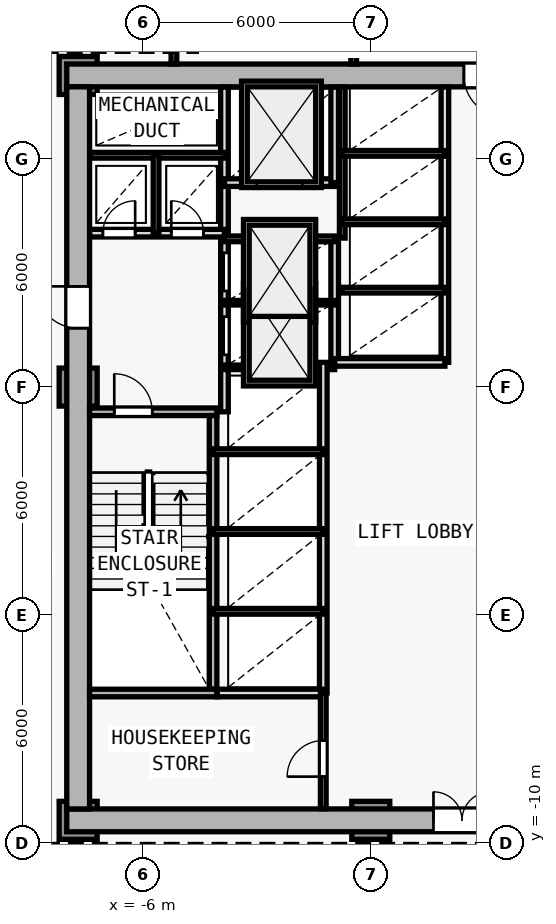
"""IFC4 building model, lengths in metres.
Left out: names, types, materials, properties, quantities, classifications, styles, units other than length and angle.
Written with IfcOpenShell. Run it as: python <this file> out.ifc"""

import sys

from ifc_helpers import new_model, si_unit, direction, frame, frame_2d, origin, origin_2d, place, context, subcontext, project, spatial, rectangle, extrude, element, fill, save


model = new_model("IFC4")
c1 = context("Model", 3, precision=1e-05, world=origin(), true_north=direction((0.0, 1.0)))
c2 = subcontext(c1, "Body", "Model", "MODEL_VIEW")
j1 = project(units=[si_unit("LENGTHUNIT", "METRE"), si_unit("PLANEANGLEUNIT", "RADIAN")], contexts=[c1])
p1 = place(None, origin())
s1 = spatial("IfcSite", under=j1, at=p1, CompositionType="ELEMENT")
p2 = place(p1, origin())
s2 = spatial("IfcBuilding", under=s1, at=p2, CompositionType="ELEMENT")
p3 = place(p2, frame((0.0, 0.0, 17.6)))
s3 = spatial("IfcBuildingStorey", under=s2, at=p3, CompositionType="ELEMENT", Elevation=17.6)
for number, where, z_axis, x_axis in (
    (1, (-7.7, -9.4, 0.0), (0.0, 0.0, 1.0), (1.0, 0.0, 0.0)),
    (2, (-7.7, 10.2, 0.0), (0.0, 0.0, 1.0), (1.0, 0.0, 0.0)),
    (3, (0.0, -9.4, 0.0), (0.0, 0.0, 1.0), (1.0, 0.0, 0.0)),
    (4, (-7.7, 2.0, 0.0), (0.0, 0.0, 1.0), (1.0, 0.0, 0.0)),
):
    element("IfcColumn", number, at=place(p3, frame(where, z_axis=z_axis, x_axis=x_axis)), inside=s3, PredefinedType="COLUMN", context=c2, shape_type="SweptSolid", body=[
        extrude(rectangle(XDim=1.0, YDim=1.0, at=origin_2d()), origin(), (0.0, 0.0, 1.0), 4.2),
    ])
p4 = place(p3, frame((-8.0, -9.4, 0.0), z_axis=(0.0, 0.0, 1.0), x_axis=(1.0, 0.0, 0.0)))
e5 = element("IfcWall", 5, at=p4, inside=s3, PredefinedType="SHEAR", context=c2, shape_type="SweptSolid", body=[
    extrude(rectangle(XDim=16.0, YDim=0.6, at=frame_2d((8.0, 0.0))), origin(), (0.0, 0.0, 1.0), 3.88),
])
p5 = place(p4, frame((9.65, 0.0, 0.0)))
e6 = element("IfcOpeningElement", 6, at=p5, cuts=e5, PredefinedType="OPENING", context=c2, shape_type="SweptSolid", body=[
    extrude(rectangle(XDim=1.5, YDim=2.2, at=frame_2d((0.75, 1.1))), frame((0.0, 0.31, 0.0), z_axis=(0.0, -1.0, 0.0), x_axis=(1.0, 0.0, 0.0)), (0.0, 0.0, 1.0), 0.62),
])
p6 = place(p3, frame((8.0, 10.2, 0.0), z_axis=(0.0, 0.0, 1.0), x_axis=(-1.0, 0.0, 0.0)))
e7 = element("IfcWall", 7, at=p6, inside=s3, PredefinedType="SHEAR", context=c2, shape_type="SweptSolid", body=[
    extrude(rectangle(XDim=16.0, YDim=0.6, at=frame_2d((8.0, 0.0))), origin(), (0.0, 0.0, 1.0), 3.88),
])
p7 = place(p6, frame((4.45, 0.0, 0.0)))
e8 = element("IfcOpeningElement", 8, at=p7, cuts=e7, PredefinedType="OPENING", context=c2, shape_type="SweptSolid", body=[
    extrude(rectangle(XDim=1.1, YDim=2.15, at=frame_2d((0.55, 1.075))), frame((0.0, 0.31, 0.0), z_axis=(0.0, -1.0, 0.0), x_axis=(1.0, 0.0, 0.0)), (0.0, 0.0, 1.0), 0.62),
])
p8 = place(p3, frame((-7.7, -9.1, 0.0), z_axis=(0.0, 0.0, 1.0), x_axis=(0.0, 1.0, 0.0)))
e9 = element("IfcWall", 9, at=p8, inside=s3, PredefinedType="SHEAR", context=c2, shape_type="SweptSolid", body=[
    extrude(rectangle(XDim=19.0, YDim=0.6, at=frame_2d((9.5, 0.0))), origin(), (0.0, 0.0, 1.0), 3.88),
])
p9 = place(p8, frame((12.65, 0.0, 0.0)))
e10 = element("IfcOpeningElement", 10, at=p9, cuts=e9, PredefinedType="OPENING", context=c2, shape_type="SweptSolid", body=[
    extrude(rectangle(XDim=1.1, YDim=2.15, at=frame_2d((0.55, 1.075))), frame((0.0, 0.31, 0.0), z_axis=(0.0, -1.0, 0.0), x_axis=(1.0, 0.0, 0.0)), (0.0, 0.0, 1.0), 0.62),
])
p10 = place(p3, frame((-7.4, 1.35, 0.0), z_axis=(0.0, 0.0, 1.0), x_axis=(1.0, 0.0, 0.0)))
e11 = element("IfcWall", 11, at=p10, inside=s3, PredefinedType="SOLIDWALL", context=c2, shape_type="SweptSolid", body=[
    extrude(rectangle(XDim=3.35, YDim=0.2, at=frame_2d((1.675, 0.0))), origin(), (0.0, 0.0, 1.0), 3.88),
])
p11 = place(p10, frame((0.65, 0.0, 0.0)))
e12 = element("IfcOpeningElement", 12, at=p11, cuts=e11, PredefinedType="OPENING", context=c2, shape_type="SweptSolid", body=[
    extrude(rectangle(XDim=1.0, YDim=2.15, at=frame_2d((0.5, 1.075))), frame((0.0, 0.11, 0.0), z_axis=(0.0, -1.0, 0.0), x_axis=(1.0, 0.0, 0.0)), (0.0, 0.0, 1.0), 0.22),
])
p12 = place(p3, frame((-4.15, -5.95, 0.0), z_axis=(0.0, 0.0, 1.0), x_axis=(0.0, 1.0, 0.0)))
e13 = element("IfcWall", 13, at=p12, inside=s3, PredefinedType="SOLIDWALL", context=c2, shape_type="SweptSolid", body=[
    extrude(rectangle(XDim=7.2, YDim=0.2, at=frame_2d((3.6, 0.0))), origin(), (0.0, 0.0, 1.0), 3.88),
])
p13 = place(p3, frame((-3.85, 1.35, 0.0), z_axis=(0.0, 0.0, 1.0), x_axis=(0.0, 1.0, 0.0)))
e14 = element("IfcWall", 14, at=p13, inside=s3, PredefinedType="SOLIDWALL", context=c2, shape_type="SweptSolid", body=[
    extrude(rectangle(XDim=8.545, YDim=0.2, at=frame_2d((4.272, 0.0))), origin(), (0.0, 0.0, 1.0), 3.88),
])
p14 = place(p13, frame((1.5, 0.0, 0.0)))
e15 = element("IfcOpeningElement", 15, at=p14, cuts=e14, PredefinedType="OPENING", context=c2, shape_type="SweptSolid", body=[
    extrude(rectangle(XDim=1.0, YDim=2.15, at=frame_2d((0.5, 1.075))), frame((0.0, 0.11, 0.0), z_axis=(0.0, -1.0, 0.0), x_axis=(1.0, 0.0, 0.0)), (0.0, 0.0, 1.0), 0.22),
])
p15 = place(p13, frame((3.18, 0.0, 0.0)))
e16 = element("IfcOpeningElement", 16, at=p15, cuts=e14, PredefinedType="OPENING", context=c2, shape_type="SweptSolid", body=[
    extrude(rectangle(XDim=1.0, YDim=2.15, at=frame_2d((0.5, 1.075))), frame((0.0, 0.11, 0.0), z_axis=(0.0, -1.0, 0.0), x_axis=(1.0, 0.0, 0.0)), (0.0, 0.0, 1.0), 0.22),
])
p16 = place(p3, frame((-7.395, 6.05, 0.0), z_axis=(0.0, 0.0, 1.0), x_axis=(1.0, 0.0, 0.0)))
e17 = element("IfcWall", 17, at=p16, inside=s3, PredefinedType="SOLIDWALL", context=c2, shape_type="SweptSolid", body=[
    extrude(rectangle(XDim=3.545, YDim=0.2, at=frame_2d((1.772, 0.0))), origin(), (0.0, 0.0, 1.0), 3.88),
])
p17 = place(p16, frame((0.345, 0.0, 0.0)))
e18 = element("IfcOpeningElement", 18, at=p17, cuts=e17, PredefinedType="OPENING", context=c2, shape_type="SweptSolid", body=[
    extrude(rectangle(XDim=0.85, YDim=2.1, at=frame_2d((0.425, 1.05))), frame((0.0, 0.11, 0.0), z_axis=(0.0, -1.0, 0.0), x_axis=(1.0, 0.0, 0.0)), (0.0, 0.0, 1.0), 0.22),
])
p18 = place(p16, frame((2.145, 0.0, 0.0)))
e19 = element("IfcOpeningElement", 19, at=p18, cuts=e17, PredefinedType="OPENING", context=c2, shape_type="SweptSolid", body=[
    extrude(rectangle(XDim=0.85, YDim=2.1, at=frame_2d((0.425, 1.05))), frame((0.0, 0.11, 0.0), z_axis=(0.0, -1.0, 0.0), x_axis=(1.0, 0.0, 0.0)), (0.0, 0.0, 1.0), 0.22),
])
p19 = place(p3, frame((-7.395, 8.1, 0.0), z_axis=(0.0, 0.0, 1.0), x_axis=(1.0, 0.0, 0.0)))
e20 = element("IfcWall", 20, at=p19, inside=s3, PredefinedType="PARTITIONING", context=c2, shape_type="SweptSolid", body=[
    extrude(rectangle(XDim=3.545, YDim=0.15, at=frame_2d((1.772, 0.0))), origin(), (0.0, 0.0, 1.0), 3.88),
])
p20 = place(p3, frame((-5.65, 6.05, 0.0), z_axis=(0.0, 0.0, 1.0), x_axis=(0.0, 1.0, 0.0)))
e21 = element("IfcWall", 21, at=p20, inside=s3, PredefinedType="PARTITIONING", context=c2, shape_type="SweptSolid", body=[
    extrude(rectangle(XDim=2.05, YDim=0.15, at=frame_2d((1.025, 0.0))), origin(), (0.0, 0.0, 1.0), 3.88),
])
p21 = place(p3, frame((-0.95, 2.65, 0.0), z_axis=(0.0, 0.0, 1.0), x_axis=(0.0, 1.0, 0.0)))
e22 = element("IfcWall", 22, at=p21, inside=s3, PredefinedType="SOLIDWALL", context=c2, shape_type="SweptSolid", body=[
    extrude(rectangle(XDim=3.27, YDim=0.2, at=frame_2d((1.635, 0.0))), origin(), (0.0, 0.0, 1.0), 3.88),
])
for number, where, z_axis, x_axis in (
    (23, (-3.85, 2.52, 0.0), (0.0, 0.0, 1.0), (1.0, 0.0, 0.0)),
    (24, (-3.85, 4.22, 0.0), (0.0, 0.0, 1.0), (1.0, 0.0, 0.0)),
):
    element("IfcWall", number, at=place(p3, frame(where, z_axis=z_axis, x_axis=x_axis)), inside=s3, PredefinedType="PARTITIONING", context=c2, shape_type="SweptSolid", body=[
        extrude(rectangle(XDim=2.9, YDim=0.12, at=frame_2d((1.45, 0.0))), origin(), (0.0, 0.0, 1.0), 3.88),
    ])
p22 = place(p3, frame((-3.85, 5.9, 0.0), z_axis=(0.0, 0.0, 1.0), x_axis=(1.0, 0.0, 0.0)))
e25 = element("IfcWall", 25, at=p22, inside=s3, PredefinedType="PARTITIONING", context=c2, shape_type="SweptSolid", body=[
    extrude(rectangle(XDim=2.9, YDim=0.15, at=frame_2d((1.45, 0.0))), origin(), (0.0, 0.0, 1.0), 3.88),
])
p23 = place(p3, frame((-3.85, 7.38, 0.0), z_axis=(0.0, 0.0, 1.0), x_axis=(1.0, 0.0, 0.0)))
e26 = element("IfcWall", 26, at=p23, inside=s3, PredefinedType="SOLIDWALL", context=c2, shape_type="SweptSolid", body=[
    extrude(rectangle(XDim=2.9, YDim=0.2, at=frame_2d((1.45, 0.0))), origin(), (0.0, 0.0, 1.0), 3.88),
])
p24 = place(p23, frame((0.85, 0.0, 0.0)))
e27 = element("IfcOpeningElement", 27, at=p24, cuts=e26, PredefinedType="OPENING", context=c2, shape_type="SweptSolid", body=[
    extrude(rectangle(XDim=1.2, YDim=2.2, at=frame_2d((0.6, 1.1))), frame((0.0, 0.11, 0.0), z_axis=(0.0, -1.0, 0.0), x_axis=(1.0, 0.0, 0.0)), (0.0, 0.0, 1.0), 0.22),
])
p25 = place(p3, frame((-0.95, 7.38, 0.0), z_axis=(0.0, 0.0, 1.0), x_axis=(0.0, 1.0, 0.0)))
e28 = element("IfcWall", 28, at=p25, inside=s3, PredefinedType="SOLIDWALL", context=c2, shape_type="SweptSolid", body=[
    extrude(rectangle(XDim=2.515, YDim=0.2, at=frame_2d((1.258, 0.0))), origin(), (0.0, 0.0, 1.0), 3.88),
])
p26 = place(p3, frame((-1.25, -6.05, 0.0), z_axis=(0.0, 0.0, 1.0), x_axis=(0.0, 1.0, 0.0)))
e29 = element("IfcWall", 29, at=p26, inside=s3, PredefinedType="SOLIDWALL", context=c2, shape_type="SweptSolid", body=[
    extrude(rectangle(XDim=8.7, YDim=0.2, at=frame_2d((4.35, 0.0))), origin(), (0.0, 0.0, 1.0), 3.88),
])
for number, where, z_axis, x_axis in (
    (30, (-4.15, -3.9, 0.0), (0.0, 0.0, 1.0), (1.0, 0.0, 0.0)),
    (31, (-4.15, -1.8, 0.0), (0.0, 0.0, 1.0), (1.0, 0.0, 0.0)),
    (32, (-4.15, 0.3, 0.0), (0.0, 0.0, 1.0), (1.0, 0.0, 0.0)),
):
    element("IfcWall", number, at=place(p3, frame(where, z_axis=z_axis, x_axis=x_axis)), inside=s3, PredefinedType="PARTITIONING", context=c2, shape_type="SweptSolid", body=[
        extrude(rectangle(XDim=2.9, YDim=0.15, at=frame_2d((1.45, 0.0))), origin(), (0.0, 0.0, 1.0), 3.88),
    ])
p27 = place(p3, frame((1.95, 2.65, 0.0), z_axis=(0.0, 0.0, 1.0), x_axis=(0.0, 1.0, 0.0)))
e33 = element("IfcWall", 33, at=p27, inside=s3, PredefinedType="SOLIDWALL", context=c2, shape_type="SweptSolid", body=[
    extrude(rectangle(XDim=7.245, YDim=0.2, at=frame_2d((3.623, 0.0))), origin(), (0.0, 0.0, 1.0), 3.88),
])
p28 = place(p3, frame((-0.95, 2.65, 0.0), z_axis=(0.0, 0.0, 1.0), x_axis=(1.0, 0.0, 0.0)))
e34 = element("IfcWall", 34, at=p28, inside=s3, PredefinedType="SOLIDWALL", context=c2, shape_type="SweptSolid", body=[
    extrude(rectangle(XDim=2.9, YDim=0.2, at=frame_2d((1.45, 0.0))), origin(), (0.0, 0.0, 1.0), 3.88),
])
p29 = place(p3, frame((-0.75, 5.92, 0.0), z_axis=(0.0, 0.0, 1.0), x_axis=(0.0, 1.0, 0.0)))
e35 = element("IfcWall", 35, at=p29, inside=s3, PredefinedType="PARTITIONING", context=c2, shape_type="SweptSolid", body=[
    extrude(rectangle(XDim=3.975, YDim=0.15, at=frame_2d((1.988, 0.0))), origin(), (0.0, 0.0, 1.0), 3.88),
])
for number, where, z_axis, x_axis in (
    (36, (-0.75, 4.55, 0.0), (0.0, 0.0, 1.0), (1.0, 0.0, 0.0)),
    (37, (-0.75, 6.35, 0.0), (0.0, 0.0, 1.0), (1.0, 0.0, 0.0)),
    (38, (-0.75, 8.15, 0.0), (0.0, 0.0, 1.0), (1.0, 0.0, 0.0)),
):
    element("IfcWall", number, at=place(p3, frame(where, z_axis=z_axis, x_axis=x_axis)), inside=s3, PredefinedType="PARTITIONING", context=c2, shape_type="SweptSolid", body=[
        extrude(rectangle(XDim=2.7, YDim=0.15, at=frame_2d((1.35, 0.0))), origin(), (0.0, 0.0, 1.0), 3.88),
    ])
p30 = place(p3, frame((-7.4, -6.05, 0.0), z_axis=(0.0, 0.0, 1.0), x_axis=(1.0, 0.0, 0.0)))
e39 = element("IfcWall", 39, at=p30, inside=s3, PredefinedType="SOLIDWALL", context=c2, shape_type="SweptSolid", body=[
    extrude(rectangle(XDim=3.35, YDim=0.2, at=frame_2d((1.675, 0.0))), origin(), (0.0, 0.0, 1.0), 3.88),
])
p31 = place(p3, frame((-4.04, -6.05, 0.0), z_axis=(0.0, 0.0, 1.0), x_axis=(1.0, 0.0, 0.0)))
e40 = element("IfcWall", 40, at=p31, inside=s3, PredefinedType="SOLIDWALL", context=c2, shape_type="SweptSolid", body=[
    extrude(rectangle(XDim=2.79, YDim=0.2, at=frame_2d((1.395, 0.0))), origin(), (0.0, 0.0, 1.0), 3.88),
])
p32 = place(p3, frame((-1.25, -9.095, 0.0), z_axis=(0.0, 0.0, 1.0), x_axis=(0.0, 1.0, 0.0)))
e41 = element("IfcWall", 41, at=p32, inside=s3, PredefinedType="PARTITIONING", context=c2, shape_type="SweptSolid", body=[
    extrude(rectangle(XDim=3.045, YDim=0.15, at=frame_2d((1.522, 0.0))), origin(), (0.0, 0.0, 1.0), 3.88),
])
p33 = place(p32, frame((0.845, 0.0, 0.0)))
e42 = element("IfcOpeningElement", 42, at=p33, cuts=e41, PredefinedType="OPENING", context=c2, shape_type="SweptSolid", body=[
    extrude(rectangle(XDim=0.95, YDim=2.1, at=frame_2d((0.475, 1.05))), frame((0.0, 0.085, 0.0), z_axis=(0.0, -1.0, 0.0), x_axis=(1.0, 0.0, 0.0)), (0.0, 0.0, 1.0), 0.17),
])
p34 = place(p3, frame((-5.18, 10.5, 0.0), z_axis=(0.0, 0.0, 1.0), x_axis=(0.0, 1.0, 0.0)))
e43 = element("IfcWall", 43, at=p34, inside=s3, PredefinedType="PARTITIONING", context=c2, shape_type="SweptSolid", body=[
    extrude(rectangle(XDim=7.78, YDim=0.15, at=frame_2d((3.89, 0.0))), origin(), (0.0, 0.0, 1.0), 3.88),
])
p35 = place(p34, frame((1.849, 0.0, 0.0)))
e44 = element("IfcOpeningElement", 44, at=p35, cuts=e43, PredefinedType="OPENING", context=c2, shape_type="SweptSolid", body=[
    extrude(rectangle(XDim=0.9, YDim=2.1, at=frame_2d((0.45, 1.05))), frame((0.0, 0.085, 0.0), z_axis=(0.0, -1.0, 0.0), x_axis=(1.0, 0.0, 0.0)), (0.0, 0.0, 1.0), 0.17),
])
p36 = place(p3, frame((-0.45, 10.5, 0.0), z_axis=(0.0, 0.0, 1.0), x_axis=(0.0, 1.0, 0.0)))
e45 = element("IfcWall", 45, at=p36, inside=s3, PredefinedType="PARTITIONING", context=c2, shape_type="SweptSolid", body=[
    extrude(rectangle(XDim=4.75, YDim=0.15, at=frame_2d((2.375, 0.0))), origin(), (0.0, 0.0, 1.0), 3.88),
])
p37 = place(p5, origin())
e46 = element("IfcDoor", 46, at=p37, inside=s3, OperationType="DOUBLE_DOOR_SINGLE_SWING", PredefinedType="DOOR", context=c2, shape_type="SweptSolid", body=[
    extrude(rectangle(XDim=1.5, YDim=2.2, at=frame_2d((0.75, 1.1))), frame((0.0, 0.025, 0.0), z_axis=(0.0, -1.0, 0.0), x_axis=(1.0, 0.0, 0.0)), (0.0, 0.0, 1.0), 0.05),
])
fill(e6, e46)
p38 = place(p9, origin())
e47 = element("IfcDoor", 47, at=p38, inside=s3, OperationType="SINGLE_SWING_RIGHT", PredefinedType="DOOR", context=c2, shape_type="SweptSolid", body=[
    extrude(rectangle(XDim=1.1, YDim=2.15, at=frame_2d((0.55, 1.075))), frame((0.0, 0.025, 0.0), z_axis=(0.0, -1.0, 0.0), x_axis=(1.0, 0.0, 0.0)), (0.0, 0.0, 1.0), 0.05),
])
fill(e10, e47)
p39 = place(p7, origin())
e48 = element("IfcDoor", 48, at=p39, inside=s3, OperationType="SINGLE_SWING_LEFT", PredefinedType="DOOR", context=c2, shape_type="SweptSolid", body=[
    extrude(rectangle(XDim=1.1, YDim=2.15, at=frame_2d((0.55, 1.075))), frame((0.0, 0.025, 0.0), z_axis=(0.0, -1.0, 0.0), x_axis=(1.0, 0.0, 0.0)), (0.0, 0.0, 1.0), 0.05),
])
fill(e8, e48)
p40 = place(p11, origin())
e49 = element("IfcDoor", 49, at=p40, inside=s3, OperationType="SINGLE_SWING_LEFT", PredefinedType="DOOR", context=c2, shape_type="SweptSolid", body=[
    extrude(rectangle(XDim=1.0, YDim=2.15, at=frame_2d((0.5, 1.075))), frame((0.0, 0.025, 0.0), z_axis=(0.0, -1.0, 0.0), x_axis=(1.0, 0.0, 0.0)), (0.0, 0.0, 1.0), 0.05),
])
fill(e12, e49)
p41 = place(p17, origin())
e50 = element("IfcDoor", 50, at=p41, inside=s3, OperationType="SINGLE_SWING_RIGHT", PredefinedType="DOOR", context=c2, shape_type="SweptSolid", body=[
    extrude(rectangle(XDim=0.85, YDim=2.1, at=frame_2d((0.425, 1.05))), frame((0.0, 0.025, 0.0), z_axis=(0.0, -1.0, 0.0), x_axis=(1.0, 0.0, 0.0)), (0.0, 0.0, 1.0), 0.05),
])
fill(e18, e50)
p42 = place(p18, origin())
e51 = element("IfcDoor", 51, at=p42, inside=s3, OperationType="SINGLE_SWING_LEFT", PredefinedType="DOOR", context=c2, shape_type="SweptSolid", body=[
    extrude(rectangle(XDim=0.85, YDim=2.1, at=frame_2d((0.425, 1.05))), frame((0.0, 0.025, 0.0), z_axis=(0.0, -1.0, 0.0), x_axis=(1.0, 0.0, 0.0)), (0.0, 0.0, 1.0), 0.05),
])
fill(e19, e51)
p43 = place(p24, origin())
e52 = element("IfcDoor", 52, at=p43, inside=s3, OperationType="DOUBLE_DOOR_SLIDING", PredefinedType="DOOR", context=c2, shape_type="SweptSolid", body=[
    extrude(rectangle(XDim=1.2, YDim=2.2, at=frame_2d((0.6, 1.1))), frame((0.0, 0.025, 0.0), z_axis=(0.0, -1.0, 0.0), x_axis=(1.0, 0.0, 0.0)), (0.0, 0.0, 1.0), 0.05),
])
fill(e27, e52)
p44 = place(p14, origin())
e53 = element("IfcDoor", 53, at=p44, inside=s3, OperationType="DOUBLE_DOOR_SLIDING", PredefinedType="DOOR", context=c2, shape_type="SweptSolid", body=[
    extrude(rectangle(XDim=1.0, YDim=2.15, at=frame_2d((0.5, 1.075))), frame((0.0, 0.025, 0.0), z_axis=(0.0, -1.0, 0.0), x_axis=(1.0, 0.0, 0.0)), (0.0, 0.0, 1.0), 0.05),
])
fill(e15, e53)
p45 = place(p15, origin())
e54 = element("IfcDoor", 54, at=p45, inside=s3, OperationType="DOUBLE_DOOR_SLIDING", PredefinedType="DOOR", context=c2, shape_type="SweptSolid", body=[
    extrude(rectangle(XDim=1.0, YDim=2.15, at=frame_2d((0.5, 1.075))), frame((0.0, 0.025, 0.0), z_axis=(0.0, -1.0, 0.0), x_axis=(1.0, 0.0, 0.0)), (0.0, 0.0, 1.0), 0.05),
])
fill(e16, e54)
p46 = place(p33, origin())
e55 = element("IfcDoor", 55, at=p46, inside=s3, OperationType="SINGLE_SWING_LEFT", PredefinedType="DOOR", context=c2, shape_type="SweptSolid", body=[
    extrude(rectangle(XDim=0.95, YDim=2.1, at=frame_2d((0.475, 1.05))), frame((0.0, 0.025, 0.0), z_axis=(0.0, -1.0, 0.0), x_axis=(1.0, 0.0, 0.0)), (0.0, 0.0, 1.0), 0.05),
])
fill(e42, e55)
save(model, sys.argv[1])
